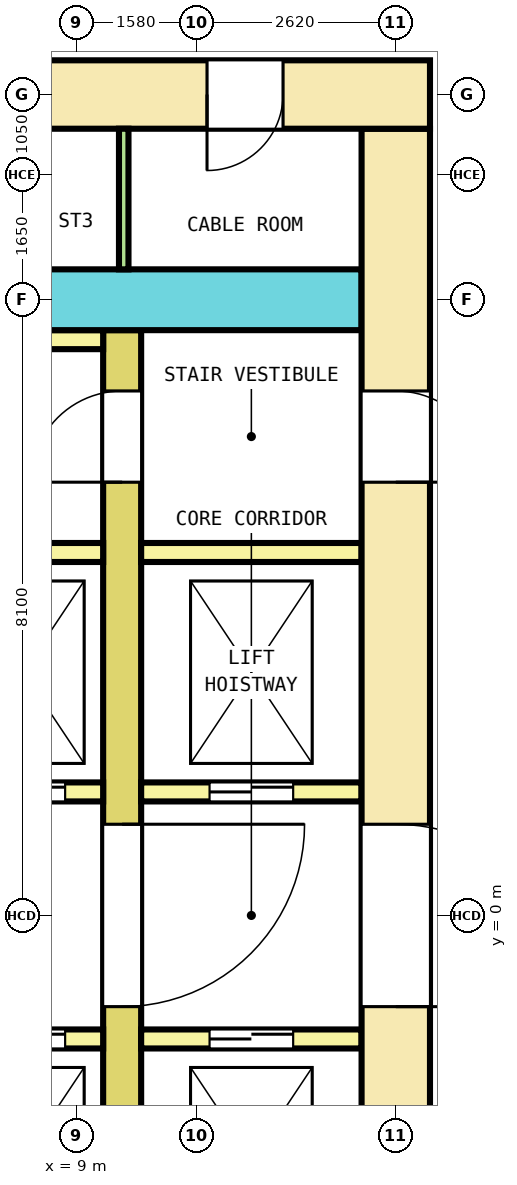
"""IFC4 building model, lengths in metres.
Left out: names, types, materials, properties, quantities, classifications, styles, units other than length and angle.
Written with IfcOpenShell. Run it as: python <this file> out.ifc"""

import sys

from ifc_helpers import new_model, si_unit, direction, frame, frame_2d, origin, place, context, subcontext, project, spatial, rectangle, extrude, element, fill, save


model = new_model("IFC4")
c1 = context("Model", 3, precision=1e-05, world=origin(), true_north=direction((0.0, 1.0)))
c2 = subcontext(c1, "Body", "Model", "MODEL_VIEW")
j1 = project(units=[si_unit("LENGTHUNIT", "METRE"), si_unit("PLANEANGLEUNIT", "RADIAN")], contexts=[c1])
p1 = place(None, origin())
s1 = spatial("IfcSite", under=j1, at=p1, CompositionType="ELEMENT")
p2 = place(p1, origin())
s2 = spatial("IfcBuilding", under=s1, at=p2, CompositionType="ELEMENT")
p3 = place(p2, frame((0.0, 0.0, 58.6)))
s3 = spatial("IfcBuildingStorey", under=s2, at=p3, CompositionType="ELEMENT", Elevation=58.6)
p4 = place(p3, frame((-13.65, 10.8, 0.0), z_axis=(0.0, 0.0, 1.0), x_axis=(1.0, 0.0, 0.0)))
e1 = element("IfcWall", 1, at=p4, inside=s3, PredefinedType="SHEAR", context=c2, shape_type="SweptSolid", body=[
    extrude(rectangle(XDim=27.3, YDim=0.9, at=frame_2d((13.65, 0.0))), origin(), (0.0, 0.0, 1.0), 4.1),
])
p5 = place(p4, frame((2.4, 0.0, 0.0)))
e2 = element("IfcOpeningElement", 2, at=p5, cuts=e1, PredefinedType="OPENING", context=c2, shape_type="SweptSolid", body=[
    extrude(rectangle(XDim=1.0, YDim=2.1, at=frame_2d((0.5, 1.05))), frame((0.0, 0.46, 0.0), z_axis=(0.0, -1.0, 0.0), x_axis=(1.0, 0.0, 0.0)), (0.0, 0.0, 1.0), 0.92),
])
p6 = place(p4, frame((6.494, 0.0, 0.0)))
e3 = element("IfcOpeningElement", 3, at=p6, cuts=e1, PredefinedType="OPENING", context=c2, shape_type="SweptSolid", body=[
    extrude(rectangle(XDim=1.0, YDim=2.1, at=frame_2d((0.5, 1.05))), frame((0.0, 0.46, 0.0), z_axis=(0.0, -1.0, 0.0), x_axis=(1.0, 0.0, 0.0)), (0.0, 0.0, 1.0), 0.92),
])
p7 = place(p4, frame((10.556, 0.0, 0.0)))
e4 = element("IfcOpeningElement", 4, at=p7, cuts=e1, PredefinedType="OPENING", context=c2, shape_type="SweptSolid", body=[
    extrude(rectangle(XDim=1.0, YDim=2.1, at=frame_2d((0.5, 1.05))), frame((0.0, 0.46, 0.0), z_axis=(0.0, -1.0, 0.0), x_axis=(1.0, 0.0, 0.0)), (0.0, 0.0, 1.0), 0.92),
])
p8 = place(p4, frame((18.077, 0.0, 0.0)))
e5 = element("IfcOpeningElement", 5, at=p8, cuts=e1, PredefinedType="OPENING", context=c2, shape_type="SweptSolid", body=[
    extrude(rectangle(XDim=1.0, YDim=2.1, at=frame_2d((0.5, 1.05))), frame((0.0, 0.46, 0.0), z_axis=(0.0, -1.0, 0.0), x_axis=(1.0, 0.0, 0.0)), (0.0, 0.0, 1.0), 0.92),
])
p9 = place(p4, frame((21.206, 0.0, 0.0)))
e6 = element("IfcOpeningElement", 6, at=p9, cuts=e1, PredefinedType="OPENING", context=c2, shape_type="SweptSolid", body=[
    extrude(rectangle(XDim=1.0, YDim=2.1, at=frame_2d((0.5, 1.05))), frame((0.0, 0.46, 0.0), z_axis=(0.0, -1.0, 0.0), x_axis=(1.0, 0.0, 0.0)), (0.0, 0.0, 1.0), 0.92),
])
p10 = place(p4, frame((24.367, 0.0, 0.0)))
e7 = element("IfcOpeningElement", 7, at=p10, cuts=e1, PredefinedType="OPENING", context=c2, shape_type="SweptSolid", body=[
    extrude(rectangle(XDim=1.0, YDim=2.1, at=frame_2d((0.5, 1.05))), frame((0.0, 0.46, 0.0), z_axis=(0.0, -1.0, 0.0), x_axis=(1.0, 0.0, 0.0)), (0.0, 0.0, 1.0), 0.92),
])
p11 = place(p4, frame((14.575, 0.0, 0.0)))
e8 = element("IfcOpeningElement", 8, at=p11, cuts=e1, PredefinedType="OPENING", context=c2, shape_type="SweptSolid", body=[
    extrude(rectangle(XDim=1.4, YDim=2.1, at=frame_2d((0.7, 1.05))), frame((0.0, 0.46, 0.0), z_axis=(0.0, -1.0, 0.0), x_axis=(1.0, 0.0, 0.0)), (0.0, 0.0, 1.0), 0.92),
])
p12 = place(p3, frame((13.2, -10.35, 0.0), z_axis=(0.0, 0.0, 1.0), x_axis=(0.0, 1.0, 0.0)))
e9 = element("IfcWall", 9, at=p12, inside=s3, PredefinedType="SHEAR", context=c2, shape_type="SweptSolid", body=[
    extrude(rectangle(XDim=20.7, YDim=0.9, at=frame_2d((10.35, 0.0))), origin(), (0.0, 0.0, 1.0), 4.1),
])
p13 = place(p12, frame((9.15, 0.0, 0.0)))
e10 = element("IfcOpeningElement", 10, at=p13, cuts=e9, PredefinedType="OPENING", context=c2, shape_type="SweptSolid", body=[
    extrude(rectangle(XDim=2.4, YDim=2.1, at=frame_2d((1.2, 1.05))), frame((0.0, 0.46, 0.0), z_axis=(0.0, -1.0, 0.0), x_axis=(1.0, 0.0, 0.0)), (0.0, 0.0, 1.0), 0.92),
])
p14 = place(p12, frame((16.05, 0.0, 0.0)))
e11 = element("IfcOpeningElement", 11, at=p14, cuts=e9, PredefinedType="OPENING", context=c2, shape_type="SweptSolid", body=[
    extrude(rectangle(XDim=1.2, YDim=2.1, at=frame_2d((0.6, 1.05))), frame((0.0, 0.46, 0.0), z_axis=(0.0, -1.0, 0.0), x_axis=(1.0, 0.0, 0.0)), (0.0, 0.0, 1.0), 0.92),
])
p15 = place(p12, frame((2.819, 0.0, 0.0)))
e12 = element("IfcOpeningElement", 12, at=p15, cuts=e9, PredefinedType="OPENING", context=c2, shape_type="SweptSolid", body=[
    extrude(rectangle(XDim=1.0, YDim=2.1, at=frame_2d((0.5, 1.05))), frame((0.0, 0.46, 0.0), z_axis=(0.0, -1.0, 0.0), x_axis=(1.0, 0.0, 0.0)), (0.0, 0.0, 1.0), 0.92),
])
p16 = place(p12, frame((4.281, 0.0, 0.0)))
e13 = element("IfcOpeningElement", 13, at=p16, cuts=e9, PredefinedType="OPENING", context=c2, shape_type="SweptSolid", body=[
    extrude(rectangle(XDim=1.0, YDim=2.1, at=frame_2d((0.5, 1.05))), frame((0.0, 0.46, 0.0), z_axis=(0.0, -1.0, 0.0), x_axis=(1.0, 0.0, 0.0)), (0.0, 0.0, 1.0), 0.92),
])
p17 = place(p3, frame((-12.75, 8.1, 0.0), z_axis=(0.0, 0.0, 1.0), x_axis=(1.0, 0.0, 0.0)))
e14 = element("IfcWall", 14, at=p17, inside=s3, PredefinedType="SHEAR", context=c2, shape_type="SweptSolid", body=[
    extrude(rectangle(XDim=25.5, YDim=0.8, at=frame_2d((12.75, 0.0))), origin(), (0.0, 0.0, 1.0), 4.1),
])
p18 = place(p17, frame((13.675, 0.0, 0.0)))
e15 = element("IfcOpeningElement", 15, at=p18, cuts=e14, PredefinedType="OPENING", context=c2, shape_type="SweptSolid", body=[
    extrude(rectangle(XDim=1.4, YDim=2.1, at=frame_2d((0.7, 1.05))), frame((0.0, 0.41, 0.0), z_axis=(0.0, -1.0, 0.0), x_axis=(1.0, 0.0, 0.0)), (0.0, 0.0, 1.0), 0.82),
])
p19 = place(p3, frame((9.6, -7.7, 0.0), z_axis=(0.0, 0.0, 1.0), x_axis=(0.0, 1.0, 0.0)))
e16 = element("IfcWall", 16, at=p19, inside=s3, PredefinedType="SHEAR", context=c2, shape_type="SweptSolid", body=[
    extrude(rectangle(XDim=15.4, YDim=0.5, at=frame_2d((7.7, 0.0))), origin(), (0.0, 0.0, 1.0), 4.1),
])
p20 = place(p19, frame((6.5, 0.0, 0.0)))
e17 = element("IfcOpeningElement", 17, at=p20, cuts=e16, PredefinedType="OPENING", context=c2, shape_type="SweptSolid", body=[
    extrude(rectangle(XDim=2.4, YDim=2.1, at=frame_2d((1.2, 1.05))), frame((0.0, 0.26, 0.0), z_axis=(0.0, -1.0, 0.0), x_axis=(1.0, 0.0, 0.0)), (0.0, 0.0, 1.0), 0.52),
])
p21 = place(p19, frame((13.4, 0.0, 0.0)))
e18 = element("IfcOpeningElement", 18, at=p21, cuts=e16, PredefinedType="OPENING", context=c2, shape_type="SweptSolid", body=[
    extrude(rectangle(XDim=1.2, YDim=2.1, at=frame_2d((0.6, 1.05))), frame((0.0, 0.26, 0.0), z_axis=(0.0, -1.0, 0.0), x_axis=(1.0, 0.0, 0.0)), (0.0, 0.0, 1.0), 0.52),
])
p22 = place(p19, frame((0.9, 0.0, 0.0)))
e19 = element("IfcOpeningElement", 19, at=p22, cuts=e16, PredefinedType="OPENING", context=c2, shape_type="SweptSolid", body=[
    extrude(rectangle(XDim=1.0, YDim=2.1, at=frame_2d((0.5, 1.05))), frame((0.0, 0.26, 0.0), z_axis=(0.0, -1.0, 0.0), x_axis=(1.0, 0.0, 0.0)), (0.0, 0.0, 1.0), 0.52),
])
p23 = place(p3, frame((-9.35, 1.625, 0.0), z_axis=(0.0, 0.0, 1.0), x_axis=(1.0, 0.0, 0.0)))
e20 = element("IfcWall", 20, at=p23, inside=s3, PredefinedType="SOLIDWALL", context=c2, shape_type="SweptSolid", body=[
    extrude(rectangle(XDim=18.7, YDim=0.25, at=frame_2d((9.35, 0.0))), origin(), (0.0, 0.0, 1.0), 4.1),
])
p24 = place(p23, frame((0.5, 0.0, 0.0)))
e21 = element("IfcOpeningElement", 21, at=p24, cuts=e20, PredefinedType="OPENING", context=c2, shape_type="SweptSolid", body=[
    extrude(rectangle(XDim=1.1, YDim=2.1, at=frame_2d((0.55, 1.05))), frame((0.0, 0.135, 0.0), z_axis=(0.0, -1.0, 0.0), x_axis=(1.0, 0.0, 0.0)), (0.0, 0.0, 1.0), 0.27),
])
p25 = place(p23, frame((17.1, 0.0, 0.0)))
e22 = element("IfcOpeningElement", 22, at=p25, cuts=e20, PredefinedType="OPENING", context=c2, shape_type="SweptSolid", body=[
    extrude(rectangle(XDim=1.1, YDim=2.1, at=frame_2d((0.55, 1.05))), frame((0.0, 0.135, 0.0), z_axis=(0.0, -1.0, 0.0), x_axis=(1.0, 0.0, 0.0)), (0.0, 0.0, 1.0), 0.27),
])
p26 = place(p3, frame((9.85, 1.625, 0.0), z_axis=(0.0, 0.0, 1.0), x_axis=(1.0, 0.0, 0.0)))
e23 = element("IfcWall", 23, at=p26, inside=s3, PredefinedType="SOLIDWALL", context=c2, shape_type="SweptSolid", body=[
    extrude(rectangle(XDim=2.9, YDim=0.25, at=frame_2d((1.45, 0.0))), origin(), (0.0, 0.0, 1.0), 4.1),
])
p27 = place(p26, frame((0.9, 0.0, 0.0)))
e24 = element("IfcOpeningElement", 24, at=p27, cuts=e23, PredefinedType="OPENING", context=c2, shape_type="SweptSolid", body=[
    extrude(rectangle(XDim=1.1, YDim=2.1, at=frame_2d((0.55, 1.05))), frame((0.0, 0.135, 0.0), z_axis=(0.0, -1.0, 0.0), x_axis=(1.0, 0.0, 0.0)), (0.0, 0.0, 1.0), 0.27),
])
p28 = place(p3, frame((-9.35, 4.775, 0.0), z_axis=(0.0, 0.0, 1.0), x_axis=(1.0, 0.0, 0.0)))
e25 = element("IfcWall", 25, at=p28, inside=s3, PredefinedType="SOLIDWALL", context=c2, shape_type="SweptSolid", body=[
    extrude(rectangle(XDim=18.7, YDim=0.25, at=frame_2d((9.35, 0.0))), origin(), (0.0, 0.0, 1.0), 4.1),
])
p29 = place(p3, frame((9.85, 4.775, 0.0), z_axis=(0.0, 0.0, 1.0), x_axis=(1.0, 0.0, 0.0)))
e26 = element("IfcWall", 26, at=p29, inside=s3, PredefinedType="SOLIDWALL", context=c2, shape_type="SweptSolid", body=[
    extrude(rectangle(XDim=2.9, YDim=0.25, at=frame_2d((1.45, 0.0))), origin(), (0.0, 0.0, 1.0), 4.1),
])
p30 = place(p3, frame((-9.35, -1.625, 0.0), z_axis=(0.0, 0.0, 1.0), x_axis=(1.0, 0.0, 0.0)))
e27 = element("IfcWall", 27, at=p30, inside=s3, PredefinedType="SOLIDWALL", context=c2, shape_type="SweptSolid", body=[
    extrude(rectangle(XDim=18.7, YDim=0.25, at=frame_2d((9.35, 0.0))), origin(), (0.0, 0.0, 1.0), 4.1),
])
p31 = place(p30, frame((0.5, 0.0, 0.0)))
e28 = element("IfcOpeningElement", 28, at=p31, cuts=e27, PredefinedType="OPENING", context=c2, shape_type="SweptSolid", body=[
    extrude(rectangle(XDim=1.1, YDim=2.1, at=frame_2d((0.55, 1.05))), frame((0.0, 0.135, 0.0), z_axis=(0.0, -1.0, 0.0), x_axis=(1.0, 0.0, 0.0)), (0.0, 0.0, 1.0), 0.27),
])
p32 = place(p30, frame((17.1, 0.0, 0.0)))
e29 = element("IfcOpeningElement", 29, at=p32, cuts=e27, PredefinedType="OPENING", context=c2, shape_type="SweptSolid", body=[
    extrude(rectangle(XDim=1.1, YDim=2.1, at=frame_2d((0.55, 1.05))), frame((0.0, 0.135, 0.0), z_axis=(0.0, -1.0, 0.0), x_axis=(1.0, 0.0, 0.0)), (0.0, 0.0, 1.0), 0.27),
])
p33 = place(p3, frame((9.85, -1.625, 0.0), z_axis=(0.0, 0.0, 1.0), x_axis=(1.0, 0.0, 0.0)))
e30 = element("IfcWall", 30, at=p33, inside=s3, PredefinedType="SOLIDWALL", context=c2, shape_type="SweptSolid", body=[
    extrude(rectangle(XDim=2.9, YDim=0.25, at=frame_2d((1.45, 0.0))), origin(), (0.0, 0.0, 1.0), 4.1),
])
p34 = place(p33, frame((0.9, 0.0, 0.0)))
e31 = element("IfcOpeningElement", 31, at=p34, cuts=e30, PredefinedType="OPENING", context=c2, shape_type="SweptSolid", body=[
    extrude(rectangle(XDim=1.1, YDim=2.1, at=frame_2d((0.55, 1.05))), frame((0.0, 0.135, 0.0), z_axis=(0.0, -1.0, 0.0), x_axis=(1.0, 0.0, 0.0)), (0.0, 0.0, 1.0), 0.27),
])
p35 = place(p3, frame((3.55, 7.575, 0.0), z_axis=(0.0, 0.0, 1.0), x_axis=(1.0, 0.0, 0.0)))
e32 = element("IfcWall", 32, at=p35, inside=s3, PredefinedType="SOLIDWALL", context=c2, shape_type="SweptSolid", body=[
    extrude(rectangle(XDim=5.8, YDim=0.25, at=frame_2d((2.9, 0.0))), origin(), (0.0, 0.0, 1.0), 4.1),
])
p36 = place(p3, frame((9.621, 8.5, 0.0), z_axis=(0.0, 0.0, 1.0), x_axis=(0.0, 1.0, 0.0)))
e33 = element("IfcWall", 33, at=p36, inside=s3, PredefinedType="PARTITIONING", context=c2, shape_type="SweptSolid", body=[
    extrude(rectangle(XDim=1.85, YDim=0.125, at=frame_2d((0.925, 0.0))), origin(), (0.0, 0.0, 1.0), 4.1),
])
p37 = place(p25, origin())
e34 = element("IfcDoor", 34, at=p37, inside=s3, OperationType="DOUBLE_DOOR_SLIDING", PredefinedType="DOOR", context=c2, shape_type="SweptSolid", body=[
    extrude(rectangle(XDim=1.1, YDim=2.1, at=frame_2d((0.55, 1.05))), frame((0.0, 0.075, 0.0), z_axis=(0.0, -1.0, 0.0), x_axis=(1.0, 0.0, 0.0)), (0.0, 0.0, 1.0), 0.15),
])
fill(e22, e34)
p38 = place(p27, origin())
e35 = element("IfcDoor", 35, at=p38, inside=s3, OperationType="DOUBLE_DOOR_SLIDING", PredefinedType="DOOR", context=c2, shape_type="SweptSolid", body=[
    extrude(rectangle(XDim=1.1, YDim=2.1, at=frame_2d((0.55, 1.05))), frame((0.0, 0.075, 0.0), z_axis=(0.0, -1.0, 0.0), x_axis=(1.0, 0.0, 0.0)), (0.0, 0.0, 1.0), 0.15),
])
fill(e24, e35)
p39 = place(p32, origin())
e36 = element("IfcDoor", 36, at=p39, inside=s3, OperationType="DOUBLE_DOOR_SLIDING", PredefinedType="DOOR", context=c2, shape_type="SweptSolid", body=[
    extrude(rectangle(XDim=1.1, YDim=2.1, at=frame_2d((0.55, 1.05))), frame((0.0, 0.075, 0.0), z_axis=(0.0, -1.0, 0.0), x_axis=(1.0, 0.0, 0.0)), (0.0, 0.0, 1.0), 0.15),
])
fill(e29, e36)
p40 = place(p34, origin())
e37 = element("IfcDoor", 37, at=p40, inside=s3, OperationType="DOUBLE_DOOR_SLIDING", PredefinedType="DOOR", context=c2, shape_type="SweptSolid", body=[
    extrude(rectangle(XDim=1.1, YDim=2.1, at=frame_2d((0.55, 1.05))), frame((0.0, 0.075, 0.0), z_axis=(0.0, -1.0, 0.0), x_axis=(1.0, 0.0, 0.0)), (0.0, 0.0, 1.0), 0.15),
])
fill(e31, e37)
p41 = place(p20, origin())
e38 = element("IfcDoor", 38, at=p41, inside=s3, OperationType="DOUBLE_DOOR_SINGLE_SWING", PredefinedType="DOOR", context=c2, shape_type="SweptSolid", body=[
    extrude(rectangle(XDim=2.4, YDim=2.1, at=frame_2d((1.2, 1.05))), frame((0.0, 0.2, 0.0), z_axis=(0.0, -1.0, 0.0), x_axis=(1.0, 0.0, 0.0)), (0.0, 0.0, 1.0), 0.4),
])
fill(e17, e38)
p42 = place(p13, origin())
e39 = element("IfcDoor", 39, at=p42, inside=s3, OperationType="DOUBLE_DOOR_SINGLE_SWING", PredefinedType="DOOR", context=c2, shape_type="SweptSolid", body=[
    extrude(rectangle(XDim=2.4, YDim=2.1, at=frame_2d((1.2, 1.05))), frame((0.0, 0.3, 0.0), z_axis=(0.0, -1.0, 0.0), x_axis=(1.0, 0.0, 0.0)), (0.0, 0.0, 1.0), 0.6),
])
fill(e10, e39)
p43 = place(p21, origin())
e40 = element("IfcDoor", 40, at=p43, inside=s3, OperationType="SINGLE_SWING_LEFT", PredefinedType="DOOR", context=c2, shape_type="SweptSolid", body=[
    extrude(rectangle(XDim=1.2, YDim=2.1, at=frame_2d((0.6, 1.05))), frame((0.0, 0.2, 0.0), z_axis=(0.0, -1.0, 0.0), x_axis=(1.0, 0.0, 0.0)), (0.0, 0.0, 1.0), 0.4),
])
fill(e18, e40)
p44 = place(p14, origin())
e41 = element("IfcDoor", 41, at=p44, inside=s3, OperationType="SINGLE_SWING_RIGHT", PredefinedType="DOOR", context=c2, shape_type="SweptSolid", body=[
    extrude(rectangle(XDim=1.2, YDim=2.1, at=frame_2d((0.6, 1.05))), frame((0.0, 0.3, 0.0), z_axis=(0.0, -1.0, 0.0), x_axis=(1.0, 0.0, 0.0)), (0.0, 0.0, 1.0), 0.6),
])
fill(e11, e41)
p45 = place(p10, origin())
e42 = element("IfcDoor", 42, at=p45, inside=s3, OperationType="SINGLE_SWING_LEFT", PredefinedType="DOOR", context=c2, shape_type="SweptSolid", body=[
    extrude(rectangle(XDim=1.0, YDim=2.1, at=frame_2d((0.5, 1.05))), frame((0.0, 0.3, 0.0), z_axis=(0.0, -1.0, 0.0), x_axis=(1.0, 0.0, 0.0)), (0.0, 0.0, 1.0), 0.6),
])
fill(e7, e42)
save(model, sys.argv[1])
